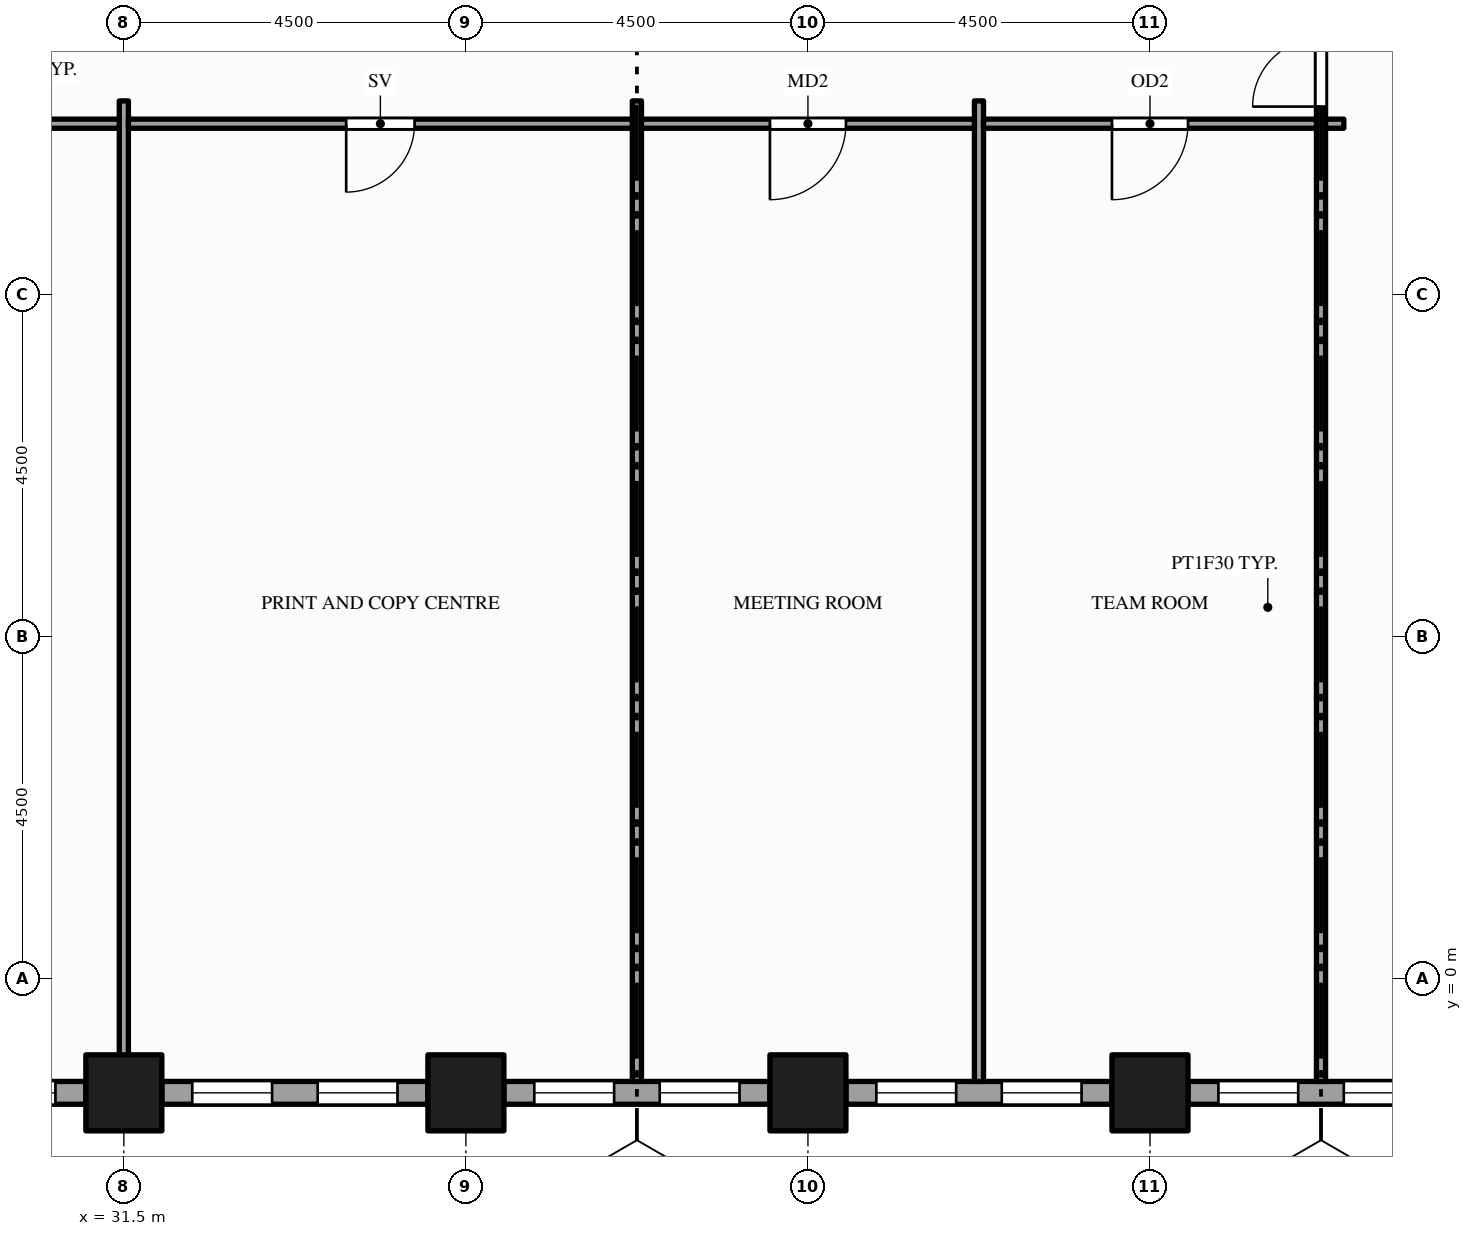
"""IFC4 building model, lengths in metres.
Left out: names, types, materials, properties, quantities, classifications, styles, units other than length and angle.
Written with IfcOpenShell. Run it as: python <this file> out.ifc"""

import sys

from ifc_helpers import new_model, si_unit, direction, frame, frame_2d, origin, origin_2d, place, context, subcontext, project, spatial, rectangle, hollow_rectangle, extrude, element, fill, save


model = new_model("IFC4")
c1 = context("Model", 3, precision=1e-05, world=origin(), true_north=direction((0.0, 1.0)))
c2 = subcontext(c1, "Body", "Model", "MODEL_VIEW")
j1 = project(units=[si_unit("LENGTHUNIT", "METRE"), si_unit("PLANEANGLEUNIT", "RADIAN")], contexts=[c1])
p1 = place(None, origin())
s1 = spatial("IfcSite", under=j1, at=p1, CompositionType="ELEMENT")
p2 = place(p1, origin())
s2 = spatial("IfcBuilding", under=s1, at=p2, CompositionType="ELEMENT")
p3 = place(p2, frame((0.0, 0.0, 123.0)))
s3 = spatial("IfcBuildingStorey", under=s2, at=p3, CompositionType="ELEMENT", Elevation=123.0)
for number, where, z_axis, x_axis in (
    (1, (31.5, -1.5, -0.15), (0.0, 0.0, 1.0), (1.0, 0.0, 0.0)),
    (2, (36.0, -1.5, -0.15), (0.0, 0.0, 1.0), (1.0, 0.0, 0.0)),
    (3, (40.5, -1.5, -0.15), (0.0, 0.0, 1.0), (1.0, 0.0, 0.0)),
    (4, (45.0, -1.5, -0.15), (0.0, 0.0, 1.0), (1.0, 0.0, 0.0)),
):
    element("IfcColumn", number, at=place(p3, frame(where, z_axis=z_axis, x_axis=x_axis)), inside=s3, PredefinedType="COLUMN", context=c2, shape_type="SweptSolid", body=[
        extrude(hollow_rectangle(XDim=1.0, YDim=1.0, WallThickness=0.05, at=origin_2d()), origin(), (0.0, 0.0, 1.0), 4.0),
    ])
p4 = place(p3, frame((27.5, -1.5, 0.0), z_axis=(0.0, 0.0, 1.0), x_axis=(1.0, 0.0, 0.0)))
e5 = element("IfcWall", 5, at=p4, inside=s3, PredefinedType="STANDARD", context=c2, shape_type="SweptSolid", body=[
    extrude(rectangle(XDim=3.5, YDim=0.3, at=frame_2d((1.75, 0.0))), origin(), (0.0, 0.0, 1.0), 3.154),
])
p5 = place(p4, frame((0.4, 0.0, 0.9)))
e6 = element("IfcOpeningElement", 6, at=p5, cuts=e5, PredefinedType="OPENING", context=c2, shape_type="SweptSolid", body=[
    extrude(rectangle(XDim=1.05, YDim=2.0, at=frame_2d((0.525, 1.0))), frame((0.0, 0.16, 0.0), z_axis=(0.0, -1.0, 0.0), x_axis=(1.0, 0.0, 0.0)), (0.0, 0.0, 1.0), 0.32),
])
p6 = place(p4, frame((2.05, 0.0, 0.9)))
e7 = element("IfcOpeningElement", 7, at=p6, cuts=e5, PredefinedType="OPENING", context=c2, shape_type="SweptSolid", body=[
    extrude(rectangle(XDim=1.05, YDim=2.0, at=frame_2d((0.525, 1.0))), frame((0.0, 0.16, 0.0), z_axis=(0.0, -1.0, 0.0), x_axis=(1.0, 0.0, 0.0)), (0.0, 0.0, 1.0), 0.32),
])
p7 = place(p3, frame((32.0, -1.5, 0.0), z_axis=(0.0, 0.0, 1.0), x_axis=(1.0, 0.0, 0.0)))
e8 = element("IfcWall", 8, at=p7, inside=s3, PredefinedType="STANDARD", context=c2, shape_type="SweptSolid", body=[
    extrude(rectangle(XDim=3.5, YDim=0.3, at=frame_2d((1.75, 0.0))), origin(), (0.0, 0.0, 1.0), 3.154),
])
p8 = place(p7, frame((0.4, 0.0, 0.9)))
e9 = element("IfcOpeningElement", 9, at=p8, cuts=e8, PredefinedType="OPENING", context=c2, shape_type="SweptSolid", body=[
    extrude(rectangle(XDim=1.05, YDim=2.0, at=frame_2d((0.525, 1.0))), frame((0.0, 0.16, 0.0), z_axis=(0.0, -1.0, 0.0), x_axis=(1.0, 0.0, 0.0)), (0.0, 0.0, 1.0), 0.32),
])
p9 = place(p7, frame((2.05, 0.0, 0.9)))
e10 = element("IfcOpeningElement", 10, at=p9, cuts=e8, PredefinedType="OPENING", context=c2, shape_type="SweptSolid", body=[
    extrude(rectangle(XDim=1.05, YDim=2.0, at=frame_2d((0.525, 1.0))), frame((0.0, 0.16, 0.0), z_axis=(0.0, -1.0, 0.0), x_axis=(1.0, 0.0, 0.0)), (0.0, 0.0, 1.0), 0.32),
])
p10 = place(p3, frame((36.5, -1.5, 0.0), z_axis=(0.0, 0.0, 1.0), x_axis=(1.0, 0.0, 0.0)))
e11 = element("IfcWall", 11, at=p10, inside=s3, PredefinedType="STANDARD", context=c2, shape_type="SweptSolid", body=[
    extrude(rectangle(XDim=3.5, YDim=0.3, at=frame_2d((1.75, 0.0))), origin(), (0.0, 0.0, 1.0), 3.154),
])
p11 = place(p10, frame((0.4, 0.0, 0.9)))
e12 = element("IfcOpeningElement", 12, at=p11, cuts=e11, PredefinedType="OPENING", context=c2, shape_type="SweptSolid", body=[
    extrude(rectangle(XDim=1.05, YDim=2.0, at=frame_2d((0.525, 1.0))), frame((0.0, 0.16, 0.0), z_axis=(0.0, -1.0, 0.0), x_axis=(1.0, 0.0, 0.0)), (0.0, 0.0, 1.0), 0.32),
])
p12 = place(p10, frame((2.05, 0.0, 0.9)))
e13 = element("IfcOpeningElement", 13, at=p12, cuts=e11, PredefinedType="OPENING", context=c2, shape_type="SweptSolid", body=[
    extrude(rectangle(XDim=1.05, YDim=2.0, at=frame_2d((0.525, 1.0))), frame((0.0, 0.16, 0.0), z_axis=(0.0, -1.0, 0.0), x_axis=(1.0, 0.0, 0.0)), (0.0, 0.0, 1.0), 0.32),
])
p13 = place(p3, frame((41.0, -1.5, 0.0), z_axis=(0.0, 0.0, 1.0), x_axis=(1.0, 0.0, 0.0)))
e14 = element("IfcWall", 14, at=p13, inside=s3, PredefinedType="STANDARD", context=c2, shape_type="SweptSolid", body=[
    extrude(rectangle(XDim=3.5, YDim=0.3, at=frame_2d((1.75, 0.0))), origin(), (0.0, 0.0, 1.0), 3.154),
])
p14 = place(p13, frame((0.4, 0.0, 0.9)))
e15 = element("IfcOpeningElement", 15, at=p14, cuts=e14, PredefinedType="OPENING", context=c2, shape_type="SweptSolid", body=[
    extrude(rectangle(XDim=1.05, YDim=2.0, at=frame_2d((0.525, 1.0))), frame((0.0, 0.16, 0.0), z_axis=(0.0, -1.0, 0.0), x_axis=(1.0, 0.0, 0.0)), (0.0, 0.0, 1.0), 0.32),
])
p15 = place(p13, frame((2.05, 0.0, 0.9)))
e16 = element("IfcOpeningElement", 16, at=p15, cuts=e14, PredefinedType="OPENING", context=c2, shape_type="SweptSolid", body=[
    extrude(rectangle(XDim=1.05, YDim=2.0, at=frame_2d((0.525, 1.0))), frame((0.0, 0.16, 0.0), z_axis=(0.0, -1.0, 0.0), x_axis=(1.0, 0.0, 0.0)), (0.0, 0.0, 1.0), 0.32),
])
p16 = place(p3, frame((45.5, -1.5, 0.0), z_axis=(0.0, 0.0, 1.0), x_axis=(1.0, 0.0, 0.0)))
e17 = element("IfcWall", 17, at=p16, inside=s3, PredefinedType="STANDARD", context=c2, shape_type="SweptSolid", body=[
    extrude(rectangle(XDim=3.5, YDim=0.3, at=frame_2d((1.75, 0.0))), origin(), (0.0, 0.0, 1.0), 3.154),
])
p17 = place(p16, frame((0.4, 0.0, 0.9)))
e18 = element("IfcOpeningElement", 18, at=p17, cuts=e17, PredefinedType="OPENING", context=c2, shape_type="SweptSolid", body=[
    extrude(rectangle(XDim=1.05, YDim=2.0, at=frame_2d((0.525, 1.0))), frame((0.0, 0.16, 0.0), z_axis=(0.0, -1.0, 0.0), x_axis=(1.0, 0.0, 0.0)), (0.0, 0.0, 1.0), 0.32),
])
p18 = place(p16, frame((2.05, 0.0, 0.9)))
e19 = element("IfcOpeningElement", 19, at=p18, cuts=e17, PredefinedType="OPENING", context=c2, shape_type="SweptSolid", body=[
    extrude(rectangle(XDim=1.05, YDim=2.0, at=frame_2d((0.525, 1.0))), frame((0.0, 0.16, 0.0), z_axis=(0.0, -1.0, 0.0), x_axis=(1.0, 0.0, 0.0)), (0.0, 0.0, 1.0), 0.32),
])
for number, where, z_axis, x_axis in (
    (20, (31.5, -1.35, 0.0), (0.0, 0.0, 1.0), (0.0, 1.0, 0.0)),
    (21, (38.25, -1.35, 0.0), (0.0, 0.0, 1.0), (0.0, 1.0, 0.0)),
    (22, (42.75, -1.35, 0.0), (0.0, 0.0, 1.0), (0.0, 1.0, 0.0)),
):
    element("IfcWall", number, at=place(p3, frame(where, z_axis=z_axis, x_axis=x_axis)), inside=s3, PredefinedType="PARTITIONING", context=c2, shape_type="SweptSolid", body=[
        extrude(rectangle(XDim=12.9, YDim=0.12, at=frame_2d((6.45, 0.0))), origin(), (0.0, 0.0, 1.0), 2.938),
    ])
p19 = place(p3, frame((47.25, -1.35, 0.0), z_axis=(0.0, 0.0, 1.0), x_axis=(0.0, 1.0, 0.0)))
e23 = element("IfcWall", 23, at=p19, inside=s3, PredefinedType="PARTITIONING", context=c2, shape_type="SweptSolid", body=[
    extrude(rectangle(XDim=22.2, YDim=0.12, at=frame_2d((11.1, 0.0))), origin(), (0.0, 0.0, 1.0), 2.938),
])
p20 = place(p19, frame((12.825, 0.0, 0.0)))
e24 = element("IfcOpeningElement", 24, at=p20, cuts=e23, PredefinedType="OPENING", context=c2, shape_type="SweptSolid", body=[
    extrude(rectangle(XDim=1.8, YDim=2.1, at=frame_2d((0.9, 1.05))), frame((0.0, 0.07, 0.0), z_axis=(0.0, -1.0, 0.0), x_axis=(1.0, 0.0, 0.0)), (0.0, 0.0, 1.0), 0.14),
])
p21 = place(p19, frame((15.85, 0.0, 0.0)))
e25 = element("IfcOpeningElement", 25, at=p21, cuts=e23, PredefinedType="OPENING", context=c2, shape_type="SweptSolid", body=[
    extrude(rectangle(XDim=0.9, YDim=2.1, at=frame_2d((0.45, 1.05))), frame((0.0, 0.07, 0.0), z_axis=(0.0, -1.0, 0.0), x_axis=(1.0, 0.0, 0.0)), (0.0, 0.0, 1.0), 0.14),
])
p22 = place(p19, frame((18.15, 0.0, 0.0)))
e26 = element("IfcOpeningElement", 26, at=p22, cuts=e23, PredefinedType="OPENING", context=c2, shape_type="SweptSolid", body=[
    extrude(rectangle(XDim=0.9, YDim=2.1, at=frame_2d((0.45, 1.05))), frame((0.0, 0.07, 0.0), z_axis=(0.0, -1.0, 0.0), x_axis=(1.0, 0.0, 0.0)), (0.0, 0.0, 1.0), 0.14),
])
p23 = place(p19, frame((20.35, 0.0, 0.0)))
e27 = element("IfcOpeningElement", 27, at=p23, cuts=e23, PredefinedType="OPENING", context=c2, shape_type="SweptSolid", body=[
    extrude(rectangle(XDim=1.0, YDim=2.1, at=frame_2d((0.5, 1.05))), frame((0.0, 0.07, 0.0), z_axis=(0.0, -1.0, 0.0), x_axis=(1.0, 0.0, 0.0)), (0.0, 0.0, 1.0), 0.14),
])
p24 = place(p3, frame((24.81, 11.25, 0.0), z_axis=(0.0, 0.0, 1.0), x_axis=(1.0, 0.0, 0.0)))
e28 = element("IfcWall", 28, at=p24, inside=s3, PredefinedType="PARTITIONING", context=c2, shape_type="SweptSolid", body=[
    extrude(rectangle(XDim=6.63, YDim=0.12, at=frame_2d((3.315, 0.0))), origin(), (0.0, 0.0, 1.0), 2.76),
])
p25 = place(p24, frame((2.865, 0.0, 0.0)))
e29 = element("IfcOpeningElement", 29, at=p25, cuts=e28, PredefinedType="OPENING", context=c2, shape_type="SweptSolid", body=[
    extrude(rectangle(XDim=0.9, YDim=2.1, at=frame_2d((0.45, 1.05))), frame((0.0, 0.07, 0.0), z_axis=(0.0, -1.0, 0.0), x_axis=(1.0, 0.0, 0.0)), (0.0, 0.0, 1.0), 0.14),
])
p26 = place(p3, frame((31.56, 11.25, 0.0), z_axis=(0.0, 0.0, 1.0), x_axis=(1.0, 0.0, 0.0)))
e30 = element("IfcWall", 30, at=p26, inside=s3, PredefinedType="PARTITIONING", context=c2, shape_type="SweptSolid", body=[
    extrude(rectangle(XDim=6.63, YDim=0.12, at=frame_2d((3.315, 0.0))), origin(), (0.0, 0.0, 1.0), 2.938),
])
p27 = place(p26, frame((2.865, 0.0, 0.0)))
e31 = element("IfcOpeningElement", 31, at=p27, cuts=e30, PredefinedType="OPENING", context=c2, shape_type="SweptSolid", body=[
    extrude(rectangle(XDim=0.9, YDim=2.1, at=frame_2d((0.45, 1.05))), frame((0.0, 0.07, 0.0), z_axis=(0.0, -1.0, 0.0), x_axis=(1.0, 0.0, 0.0)), (0.0, 0.0, 1.0), 0.14),
])
p28 = place(p3, frame((38.31, 11.25, 0.0), z_axis=(0.0, 0.0, 1.0), x_axis=(1.0, 0.0, 0.0)))
e32 = element("IfcWall", 32, at=p28, inside=s3, PredefinedType="PARTITIONING", context=c2, shape_type="SweptSolid", body=[
    extrude(rectangle(XDim=4.38, YDim=0.12, at=frame_2d((2.19, 0.0))), origin(), (0.0, 0.0, 1.0), 2.938),
])
p29 = place(p28, frame((1.69, 0.0, 0.0)))
e33 = element("IfcOpeningElement", 33, at=p29, cuts=e32, PredefinedType="OPENING", context=c2, shape_type="SweptSolid", body=[
    extrude(rectangle(XDim=1.0, YDim=2.1, at=frame_2d((0.5, 1.05))), frame((0.0, 0.07, 0.0), z_axis=(0.0, -1.0, 0.0), x_axis=(1.0, 0.0, 0.0)), (0.0, 0.0, 1.0), 0.14),
])
p30 = place(p3, frame((42.81, 11.25, 0.0), z_axis=(0.0, 0.0, 1.0), x_axis=(1.0, 0.0, 0.0)))
e34 = element("IfcWall", 34, at=p30, inside=s3, PredefinedType="PARTITIONING", context=c2, shape_type="SweptSolid", body=[
    extrude(rectangle(XDim=4.38, YDim=0.12, at=frame_2d((2.19, 0.0))), origin(), (0.0, 0.0, 1.0), 2.938),
])
p31 = place(p30, frame((1.69, 0.0, 0.0)))
e35 = element("IfcOpeningElement", 35, at=p31, cuts=e34, PredefinedType="OPENING", context=c2, shape_type="SweptSolid", body=[
    extrude(rectangle(XDim=1.0, YDim=2.1, at=frame_2d((0.5, 1.05))), frame((0.0, 0.07, 0.0), z_axis=(0.0, -1.0, 0.0), x_axis=(1.0, 0.0, 0.0)), (0.0, 0.0, 1.0), 0.14),
])
p32 = place(p3, frame((47.31, 11.25, 0.0), z_axis=(0.0, 0.0, 1.0), x_axis=(1.0, 0.0, 0.0)))
e36 = element("IfcWall", 36, at=p32, inside=s3, PredefinedType="PARTITIONING", context=c2, shape_type="SweptSolid", body=[
    extrude(rectangle(XDim=0.24, YDim=0.12, at=frame_2d((0.12, 0.0))), origin(), (0.0, 0.0, 1.0), 2.938),
])
p33 = place(p6, origin())
e37 = element("IfcWindow", 37, at=p33, inside=s3, PartitioningType="SINGLE_PANEL", PredefinedType="WINDOW", context=c2, shape_type="SweptSolid", body=[
    extrude(rectangle(XDim=1.05, YDim=2.0, at=frame_2d((0.525, 1.0))), frame((0.0, 0.03, 0.0), z_axis=(0.0, -1.0, 0.0), x_axis=(1.0, 0.0, 0.0)), (0.0, 0.0, 1.0), 0.06),
])
fill(e7, e37)
p34 = place(p8, origin())
e38 = element("IfcWindow", 38, at=p34, inside=s3, PartitioningType="SINGLE_PANEL", PredefinedType="WINDOW", context=c2, shape_type="SweptSolid", body=[
    extrude(rectangle(XDim=1.05, YDim=2.0, at=frame_2d((0.525, 1.0))), frame((0.0, 0.03, 0.0), z_axis=(0.0, -1.0, 0.0), x_axis=(1.0, 0.0, 0.0)), (0.0, 0.0, 1.0), 0.06),
])
fill(e9, e38)
p35 = place(p9, origin())
e39 = element("IfcWindow", 39, at=p35, inside=s3, PartitioningType="SINGLE_PANEL", PredefinedType="WINDOW", context=c2, shape_type="SweptSolid", body=[
    extrude(rectangle(XDim=1.05, YDim=2.0, at=frame_2d((0.525, 1.0))), frame((0.0, 0.03, 0.0), z_axis=(0.0, -1.0, 0.0), x_axis=(1.0, 0.0, 0.0)), (0.0, 0.0, 1.0), 0.06),
])
fill(e10, e39)
p36 = place(p11, origin())
e40 = element("IfcWindow", 40, at=p36, inside=s3, PartitioningType="SINGLE_PANEL", PredefinedType="WINDOW", context=c2, shape_type="SweptSolid", body=[
    extrude(rectangle(XDim=1.05, YDim=2.0, at=frame_2d((0.525, 1.0))), frame((0.0, 0.03, 0.0), z_axis=(0.0, -1.0, 0.0), x_axis=(1.0, 0.0, 0.0)), (0.0, 0.0, 1.0), 0.06),
])
fill(e12, e40)
p37 = place(p12, origin())
e41 = element("IfcWindow", 41, at=p37, inside=s3, PartitioningType="SINGLE_PANEL", PredefinedType="WINDOW", context=c2, shape_type="SweptSolid", body=[
    extrude(rectangle(XDim=1.05, YDim=2.0, at=frame_2d((0.525, 1.0))), frame((0.0, 0.03, 0.0), z_axis=(0.0, -1.0, 0.0), x_axis=(1.0, 0.0, 0.0)), (0.0, 0.0, 1.0), 0.06),
])
fill(e13, e41)
p38 = place(p14, origin())
e42 = element("IfcWindow", 42, at=p38, inside=s3, PartitioningType="SINGLE_PANEL", PredefinedType="WINDOW", context=c2, shape_type="SweptSolid", body=[
    extrude(rectangle(XDim=1.05, YDim=2.0, at=frame_2d((0.525, 1.0))), frame((0.0, 0.03, 0.0), z_axis=(0.0, -1.0, 0.0), x_axis=(1.0, 0.0, 0.0)), (0.0, 0.0, 1.0), 0.06),
])
fill(e15, e42)
p39 = place(p15, origin())
e43 = element("IfcWindow", 43, at=p39, inside=s3, PartitioningType="SINGLE_PANEL", PredefinedType="WINDOW", context=c2, shape_type="SweptSolid", body=[
    extrude(rectangle(XDim=1.05, YDim=2.0, at=frame_2d((0.525, 1.0))), frame((0.0, 0.03, 0.0), z_axis=(0.0, -1.0, 0.0), x_axis=(1.0, 0.0, 0.0)), (0.0, 0.0, 1.0), 0.06),
])
fill(e16, e43)
p40 = place(p17, origin())
e44 = element("IfcWindow", 44, at=p40, inside=s3, PartitioningType="SINGLE_PANEL", PredefinedType="WINDOW", context=c2, shape_type="SweptSolid", body=[
    extrude(rectangle(XDim=1.05, YDim=2.0, at=frame_2d((0.525, 1.0))), frame((0.0, 0.03, 0.0), z_axis=(0.0, -1.0, 0.0), x_axis=(1.0, 0.0, 0.0)), (0.0, 0.0, 1.0), 0.06),
])
fill(e18, e44)
p41 = place(p18, origin())
e45 = element("IfcWindow", 45, at=p41, inside=s3, PartitioningType="SINGLE_PANEL", PredefinedType="WINDOW", context=c2, shape_type="SweptSolid", body=[
    extrude(rectangle(XDim=1.05, YDim=2.0, at=frame_2d((0.525, 1.0))), frame((0.0, 0.03, 0.0), z_axis=(0.0, -1.0, 0.0), x_axis=(1.0, 0.0, 0.0)), (0.0, 0.0, 1.0), 0.06),
])
fill(e19, e45)
p42 = place(p20, origin())
e46 = element("IfcDoor", 46, at=p42, inside=s3, OperationType="DOUBLE_DOOR_SINGLE_SWING", PredefinedType="DOOR", context=c2, shape_type="SweptSolid", body=[
    extrude(rectangle(XDim=1.8, YDim=2.1, at=frame_2d((0.9, 1.05))), frame((0.0, 0.025, 0.0), z_axis=(0.0, -1.0, 0.0), x_axis=(1.0, 0.0, 0.0)), (0.0, 0.0, 1.0), 0.05),
])
fill(e24, e46)
p43 = place(p27, origin())
e47 = element("IfcDoor", 47, at=p43, inside=s3, OperationType="SINGLE_SWING_LEFT", PredefinedType="DOOR", context=c2, shape_type="SweptSolid", body=[
    extrude(rectangle(XDim=0.9, YDim=2.1, at=frame_2d((0.45, 1.05))), frame((0.0, 0.025, 0.0), z_axis=(0.0, -1.0, 0.0), x_axis=(1.0, 0.0, 0.0)), (0.0, 0.0, 1.0), 0.05),
])
fill(e31, e47)
p44 = place(p29, origin())
e48 = element("IfcDoor", 48, at=p44, inside=s3, OperationType="SINGLE_SWING_LEFT", PredefinedType="DOOR", context=c2, shape_type="SweptSolid", body=[
    extrude(rectangle(XDim=1.0, YDim=2.1, at=frame_2d((0.5, 1.05))), frame((0.0, 0.025, 0.0), z_axis=(0.0, -1.0, 0.0), x_axis=(1.0, 0.0, 0.0)), (0.0, 0.0, 1.0), 0.05),
])
fill(e33, e48)
p45 = place(p31, origin())
e49 = element("IfcDoor", 49, at=p45, inside=s3, OperationType="SINGLE_SWING_LEFT", PredefinedType="DOOR", context=c2, shape_type="SweptSolid", body=[
    extrude(rectangle(XDim=1.0, YDim=2.1, at=frame_2d((0.5, 1.05))), frame((0.0, 0.025, 0.0), z_axis=(0.0, -1.0, 0.0), x_axis=(1.0, 0.0, 0.0)), (0.0, 0.0, 1.0), 0.05),
])
fill(e35, e49)
save(model, sys.argv[1])
